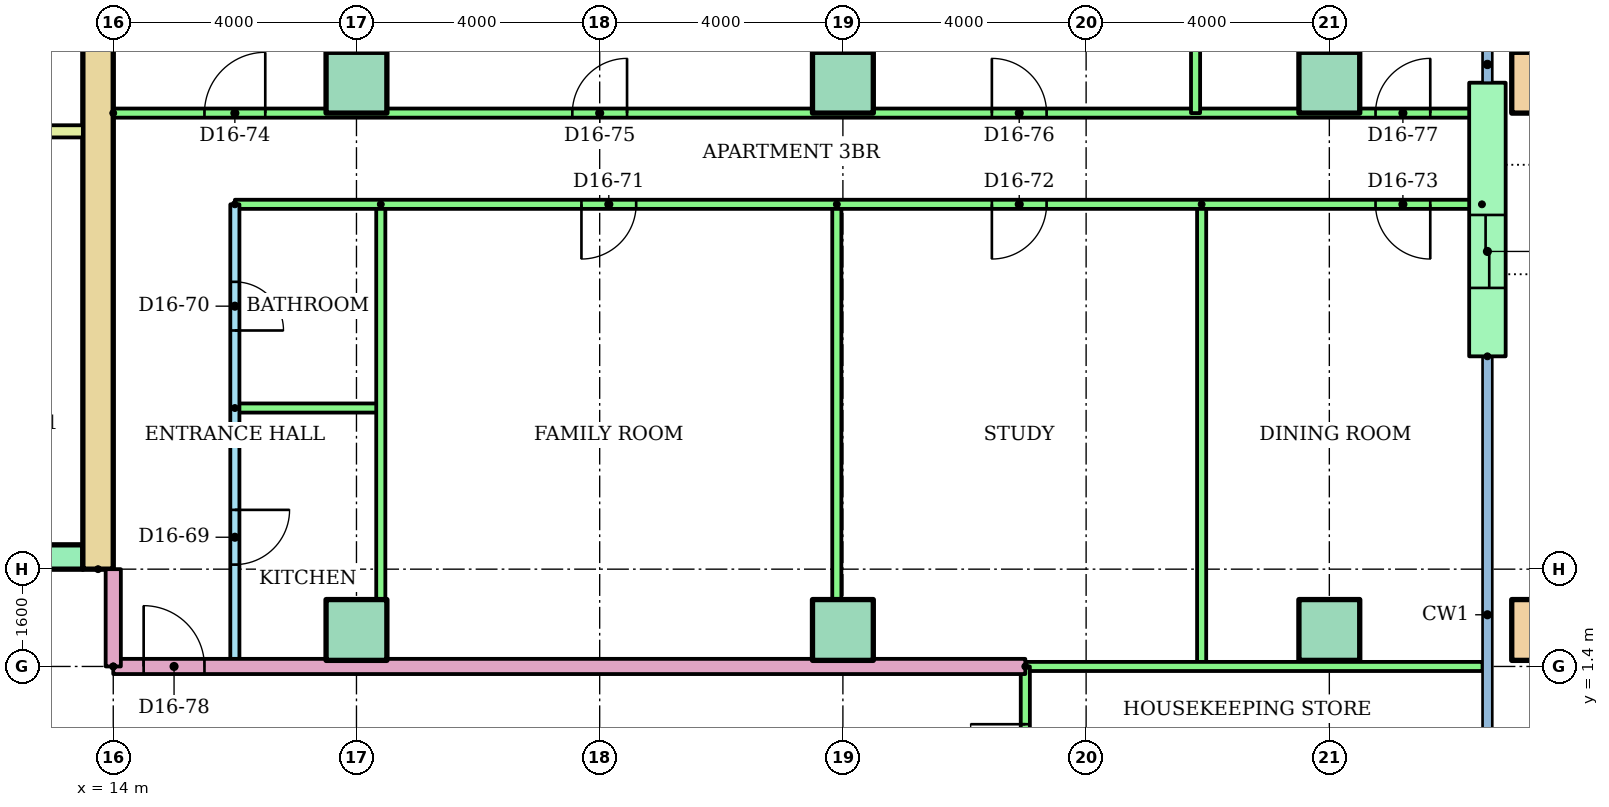
"""IFC4 building model, lengths in metres.
Left out: names, types, materials, properties, quantities, classifications, styles, units other than length and angle.
Written with IfcOpenShell. Run it as: python <this file> out.ifc"""

import sys

from ifc_helpers import new_model, si_unit, direction, frame, frame_2d, origin, origin_2d, place, context, subcontext, project, spatial, rectangle, hollow_rectangle, extrude, element, fill, save


model = new_model("IFC4")
c1 = context("Model", 3, precision=1e-05, world=origin(), true_north=direction((0.0, 1.0)))
c2 = subcontext(c1, "Body", "Model", "MODEL_VIEW")
j1 = project(units=[si_unit("LENGTHUNIT", "METRE"), si_unit("PLANEANGLEUNIT", "RADIAN")], contexts=[c1])
p1 = place(None, origin())
s1 = spatial("IfcSite", under=j1, at=p1, CompositionType="ELEMENT")
p2 = place(p1, origin())
s2 = spatial("IfcBuilding", under=s1, at=p2, CompositionType="ELEMENT")
p3 = place(p2, frame((0.0, 0.0, 60.8)))
s3 = spatial("IfcBuildingStorey", under=s2, at=p3, CompositionType="ELEMENT", Elevation=60.8)
for number, where in (
    (1, (18.0, 2.0, 0.0)),
    (2, (26.0, 2.0, 0.0)),
    (3, (34.0, 2.0, 0.0)),
):
    element("IfcColumn", number, at=place(p3, frame(where)), inside=s3, PredefinedType="COLUMN", context=c2, shape_type="SweptSolid", body=[
        extrude(rectangle(XDim=1.0, YDim=1.0, at=origin_2d()), origin(), (0.0, 0.0, 1.0), 3.2),
    ])
p4 = place(p3, frame((37.5, 2.0, 0.0)))
e4 = element("IfcColumn", 4, at=p4, inside=s3, PredefinedType="COLUMN", context=c2, shape_type="SweptSolid", body=[
    extrude(hollow_rectangle(XDim=1.0, YDim=1.0, WallThickness=0.05, at=origin_2d()), origin(), (0.0, 0.0, 1.0), 3.2),
])
for number, where in (
    (5, (18.0, 11.0, 0.0)),
    (6, (26.0, 11.0, 0.0)),
    (7, (34.0, 11.0, 0.0)),
):
    element("IfcColumn", number, at=place(p3, frame(where)), inside=s3, PredefinedType="COLUMN", context=c2, shape_type="SweptSolid", body=[
        extrude(rectangle(XDim=1.0, YDim=1.0, at=origin_2d()), origin(), (0.0, 0.0, 1.0), 3.2),
    ])
p5 = place(p3, frame((37.5, 11.0, 0.0)))
e8 = element("IfcColumn", 8, at=p5, inside=s3, PredefinedType="COLUMN", context=c2, shape_type="SweptSolid", body=[
    extrude(hollow_rectangle(XDim=1.0, YDim=1.0, WallThickness=0.05, at=origin_2d()), origin(), (0.0, 0.0, 1.0), 3.2),
])
p6 = place(p3, frame((36.6, 6.5, 0.0), z_axis=(0.0, 0.0, 1.0), x_axis=(0.0, 1.0, 0.0)))
e9 = element("IfcWall", 9, at=p6, inside=s3, PredefinedType="STANDARD", context=c2, shape_type="SweptSolid", body=[
    extrude(rectangle(XDim=4.5, YDim=0.6, at=frame_2d((2.25, 0.0))), origin(), (0.0, 0.0, 1.0), 2.8),
])
p7 = place(p6, frame((1.125, 0.0, 0.0)))
e10 = element("IfcOpeningElement", 10, at=p7, cuts=e9, PredefinedType="OPENING", context=c2, shape_type="SweptSolid", body=[
    extrude(rectangle(XDim=1.2, YDim=2.1, at=frame_2d((0.6, 1.05))), frame((0.0, 0.31, 0.0), z_axis=(0.0, -1.0, 0.0), x_axis=(1.0, 0.0, 0.0)), (0.0, 0.0, 1.0), 0.62),
])
p8 = place(p3, frame((13.75, 3.0, 0.0), z_axis=(0.0, 0.0, 1.0), x_axis=(0.0, 1.0, 0.0)))
e11 = element("IfcWall", 11, at=p8, inside=s3, PredefinedType="SHEAR", context=c2, shape_type="SweptSolid", body=[
    extrude(rectangle(XDim=17.0, YDim=0.5, at=frame_2d((8.5, 0.0))), origin(), (0.0, 0.0, 1.0), 2.8),
])
p9 = place(p3, frame((-13.5, 3.2, 0.0)))
e12 = element("IfcWall", 12, at=p9, inside=s3, PredefinedType="SHEAR", context=c2, shape_type="SweptSolid", body=[
    extrude(rectangle(XDim=27.0, YDim=0.4, at=frame_2d((13.5, 0.0))), origin(), (0.0, 0.0, 1.0), 2.8),
])
p10 = place(p9, frame((6.861, 0.0, 0.0)))
e13 = element("IfcOpeningElement", 13, at=p10, cuts=e12, PredefinedType="OPENING", context=c2, shape_type="SweptSolid", body=[
    extrude(rectangle(XDim=1.1, YDim=2.1, at=frame_2d((0.55, 1.05))), frame((0.0, 0.21, 0.0), z_axis=(0.0, -1.0, 0.0), x_axis=(1.0, 0.0, 0.0)), (0.0, 0.0, 1.0), 0.42),
])
p11 = place(p9, frame((9.906, 0.0, 0.0)))
e14 = element("IfcOpeningElement", 14, at=p11, cuts=e12, PredefinedType="OPENING", context=c2, shape_type="SweptSolid", body=[
    extrude(rectangle(XDim=1.1, YDim=2.1, at=frame_2d((0.55, 1.05))), frame((0.0, 0.21, 0.0), z_axis=(0.0, -1.0, 0.0), x_axis=(1.0, 0.0, 0.0)), (0.0, 0.0, 1.0), 0.42),
])
p12 = place(p9, frame((15.994, 0.0, 0.0)))
e15 = element("IfcOpeningElement", 15, at=p12, cuts=e12, PredefinedType="OPENING", context=c2, shape_type="SweptSolid", body=[
    extrude(rectangle(XDim=1.1, YDim=2.1, at=frame_2d((0.55, 1.05))), frame((0.0, 0.21, 0.0), z_axis=(0.0, -1.0, 0.0), x_axis=(1.0, 0.0, 0.0)), (0.0, 0.0, 1.0), 0.42),
])
p13 = place(p9, frame((19.039, 0.0, 0.0)))
e16 = element("IfcOpeningElement", 16, at=p13, cuts=e12, PredefinedType="OPENING", context=c2, shape_type="SweptSolid", body=[
    extrude(rectangle(XDim=1.1, YDim=2.1, at=frame_2d((0.55, 1.05))), frame((0.0, 0.21, 0.0), z_axis=(0.0, -1.0, 0.0), x_axis=(1.0, 0.0, 0.0)), (0.0, 0.0, 1.0), 0.42),
])
p14 = place(p9, frame((12.6, 0.0, 0.0)))
e17 = element("IfcOpeningElement", 17, at=p14, cuts=e12, PredefinedType="OPENING", context=c2, shape_type="SweptSolid", body=[
    extrude(rectangle(XDim=1.8, YDim=2.1, at=frame_2d((0.9, 1.05))), frame((0.0, 0.21, 0.0), z_axis=(0.0, -1.0, 0.0), x_axis=(1.0, 0.0, 0.0)), (0.0, 0.0, 1.0), 0.42),
])
p15 = place(p3, frame((9.6, 10.2, 0.0)))
e18 = element("IfcWall", 18, at=p15, inside=s3, PredefinedType="PARTITIONING", context=c2, shape_type="SweptSolid", body=[
    extrude(rectangle(XDim=3.9, YDim=0.2, at=frame_2d((1.95, 0.0))), origin(), (0.0, 0.0, 1.0), 2.8),
])
p16 = place(p3, frame((16.0, 9.0, 0.0), z_axis=(0.0, 0.0, 1.0), x_axis=(0.0, -1.0, 0.0)))
e19 = element("IfcWall", 19, at=p16, inside=s3, PredefinedType="PARTITIONING", context=c2, shape_type="SweptSolid", body=[
    extrude(rectangle(XDim=7.6, YDim=0.15, at=frame_2d((3.8, 0.0))), origin(), (0.0, 0.0, 1.0), 2.4),
])
p17 = place(p16, frame((5.025, 0.0, 0.0)))
e20 = element("IfcOpeningElement", 20, at=p17, cuts=e19, PredefinedType="OPENING", context=c2, shape_type="SweptSolid", body=[
    extrude(rectangle(XDim=0.9, YDim=2.1, at=frame_2d((0.45, 1.05))), frame((0.0, 0.085, 0.0), z_axis=(0.0, -1.0, 0.0), x_axis=(1.0, 0.0, 0.0)), (0.0, 0.0, 1.0), 0.17),
])
p18 = place(p16, frame((1.275, 0.0, 0.0)))
e21 = element("IfcOpeningElement", 21, at=p18, cuts=e19, PredefinedType="OPENING", context=c2, shape_type="SweptSolid", body=[
    extrude(rectangle(XDim=0.8, YDim=2.1, at=frame_2d((0.4, 1.05))), frame((0.0, 0.085, 0.0), z_axis=(0.0, -1.0, 0.0), x_axis=(1.0, 0.0, 0.0)), (0.0, 0.0, 1.0), 0.17),
])
p19 = place(p3, frame((16.0, 5.65, 0.0)))
e22 = element("IfcWall", 22, at=p19, inside=s3, PredefinedType="PARTITIONING", context=c2, shape_type="SweptSolid", body=[
    extrude(rectangle(XDim=2.4, YDim=0.15, at=frame_2d((1.2, 0.0))), origin(), (0.0, 0.0, 1.0), 2.4),
])
for number, where, z_axis, x_axis in (
    (23, (18.4, 9.0, 0.0), (0.0, 0.0, 1.0), (0.0, -1.0, 0.0)),
    (24, (25.9, 9.0, 0.0), (0.0, 0.0, 1.0), (0.0, -1.0, 0.0)),
    (25, (31.9, 9.0, 0.0), (0.0, 0.0, 1.0), (0.0, -1.0, 0.0)),
):
    element("IfcWall", number, at=place(p3, frame(where, z_axis=z_axis, x_axis=x_axis)), inside=s3, PredefinedType="PARTITIONING", context=c2, shape_type="SweptSolid", body=[
        extrude(rectangle(XDim=7.6, YDim=0.15, at=frame_2d((3.8, 0.0))), origin(), (0.0, 0.0, 1.0), 2.4),
    ])
p20 = place(p3, frame((36.51, 9.0, 0.0), z_axis=(0.0, 0.0, 1.0), x_axis=(-1.0, 0.0, 0.0)))
e26 = element("IfcWall", 26, at=p20, inside=s3, PredefinedType="PARTITIONING", context=c2, shape_type="SweptSolid", body=[
    extrude(rectangle(XDim=20.51, YDim=0.15, at=frame_2d((10.255, 0.0))), origin(), (0.0, 0.0, 1.0), 2.4),
])
p21 = place(p20, frame((13.91, 0.0, 0.0)))
e27 = element("IfcOpeningElement", 27, at=p21, cuts=e26, PredefinedType="OPENING", context=c2, shape_type="SweptSolid", body=[
    extrude(rectangle(XDim=0.9, YDim=2.1, at=frame_2d((0.45, 1.05))), frame((0.0, 0.085, 0.0), z_axis=(0.0, -1.0, 0.0), x_axis=(1.0, 0.0, 0.0)), (0.0, 0.0, 1.0), 0.17),
])
p22 = place(p20, frame((7.16, 0.0, 0.0)))
e28 = element("IfcOpeningElement", 28, at=p22, cuts=e26, PredefinedType="OPENING", context=c2, shape_type="SweptSolid", body=[
    extrude(rectangle(XDim=0.9, YDim=2.1, at=frame_2d((0.45, 1.05))), frame((0.0, 0.085, 0.0), z_axis=(0.0, -1.0, 0.0), x_axis=(1.0, 0.0, 0.0)), (0.0, 0.0, 1.0), 0.17),
])
p23 = place(p20, frame((0.85, 0.0, 0.0)))
e29 = element("IfcOpeningElement", 29, at=p23, cuts=e26, PredefinedType="OPENING", context=c2, shape_type="SweptSolid", body=[
    extrude(rectangle(XDim=0.9, YDim=2.1, at=frame_2d((0.45, 1.05))), frame((0.0, 0.085, 0.0), z_axis=(0.0, -1.0, 0.0), x_axis=(1.0, 0.0, 0.0)), (0.0, 0.0, 1.0), 0.17),
])
p24 = place(p3, frame((14.0, 10.5, 0.0)))
e30 = element("IfcWall", 30, at=p24, inside=s3, PredefinedType="PARTITIONING", context=c2, shape_type="SweptSolid", body=[
    extrude(rectangle(XDim=22.51, YDim=0.15, at=frame_2d((11.255, 0.0))), origin(), (0.0, 0.0, 1.0), 2.4),
])
p25 = place(p24, frame((1.5, 0.0, 0.0)))
e31 = element("IfcOpeningElement", 31, at=p25, cuts=e30, PredefinedType="OPENING", context=c2, shape_type="SweptSolid", body=[
    extrude(rectangle(XDim=1.0, YDim=2.1, at=frame_2d((0.5, 1.05))), frame((0.0, 0.085, 0.0), z_axis=(0.0, -1.0, 0.0), x_axis=(1.0, 0.0, 0.0)), (0.0, 0.0, 1.0), 0.17),
])
p26 = place(p24, frame((7.55, 0.0, 0.0)))
e32 = element("IfcOpeningElement", 32, at=p26, cuts=e30, PredefinedType="OPENING", context=c2, shape_type="SweptSolid", body=[
    extrude(rectangle(XDim=0.9, YDim=2.1, at=frame_2d((0.45, 1.05))), frame((0.0, 0.085, 0.0), z_axis=(0.0, -1.0, 0.0), x_axis=(1.0, 0.0, 0.0)), (0.0, 0.0, 1.0), 0.17),
])
p27 = place(p24, frame((14.45, 0.0, 0.0)))
e33 = element("IfcOpeningElement", 33, at=p27, cuts=e30, PredefinedType="OPENING", context=c2, shape_type="SweptSolid", body=[
    extrude(rectangle(XDim=0.9, YDim=2.1, at=frame_2d((0.45, 1.05))), frame((0.0, 0.085, 0.0), z_axis=(0.0, -1.0, 0.0), x_axis=(1.0, 0.0, 0.0)), (0.0, 0.0, 1.0), 0.17),
])
p28 = place(p24, frame((20.76, 0.0, 0.0)))
e34 = element("IfcOpeningElement", 34, at=p28, cuts=e30, PredefinedType="OPENING", context=c2, shape_type="SweptSolid", body=[
    extrude(rectangle(XDim=0.9, YDim=2.1, at=frame_2d((0.45, 1.05))), frame((0.0, 0.085, 0.0), z_axis=(0.0, -1.0, 0.0), x_axis=(1.0, 0.0, 0.0)), (0.0, 0.0, 1.0), 0.17),
])
for number, where, z_axis, x_axis in (
    (35, (18.0, 18.521, 0.0), (0.0, 0.0, 1.0), (0.0, -1.0, 0.0)),
    (36, (26.0, 18.521, 0.0), (0.0, 0.0, 1.0), (0.0, -1.0, 0.0)),
):
    element("IfcWall", number, at=place(p3, frame(where, z_axis=z_axis, x_axis=x_axis)), inside=s3, PredefinedType="PARTITIONING", context=c2, shape_type="SweptSolid", body=[
        extrude(rectangle(XDim=8.021, YDim=0.15, at=frame_2d((4.01, 0.0))), origin(), (0.0, 0.0, 1.0), 2.4),
    ])
p29 = place(p3, frame((31.8, 16.72, 0.0), z_axis=(0.0, 0.0, 1.0), x_axis=(0.0, -1.0, 0.0)))
e37 = element("IfcWall", 37, at=p29, inside=s3, PredefinedType="PARTITIONING", context=c2, shape_type="SweptSolid", body=[
    extrude(rectangle(XDim=6.22, YDim=0.15, at=frame_2d((3.11, 0.0))), origin(), (0.0, 0.0, 1.0), 2.4),
])
p30 = place(p3, frame((14.0, 1.4, 0.0)))
e38 = element("IfcWall", 38, at=p30, inside=s3, PredefinedType="PARTITIONING", context=c2, shape_type="SweptSolid", body=[
    extrude(rectangle(XDim=15.0, YDim=0.25, at=frame_2d((7.5, 0.0))), origin(), (0.0, 0.0, 1.0), 2.4),
])
p31 = place(p30, frame((0.5, 0.0, 0.0)))
e39 = element("IfcOpeningElement", 39, at=p31, cuts=e38, PredefinedType="OPENING", context=c2, shape_type="SweptSolid", body=[
    extrude(rectangle(XDim=1.0, YDim=2.1, at=frame_2d((0.5, 1.05))), frame((0.0, 0.135, 0.0), z_axis=(0.0, -1.0, 0.0), x_axis=(1.0, 0.0, 0.0)), (0.0, 0.0, 1.0), 0.27),
])
p32 = place(p3, frame((29.0, 1.4, 0.0)))
e40 = element("IfcWall", 40, at=p32, inside=s3, PredefinedType="PARTITIONING", context=c2, shape_type="SweptSolid", body=[
    extrude(rectangle(XDim=7.52, YDim=0.15, at=frame_2d((3.76, 0.0))), origin(), (0.0, 0.0, 1.0), 2.4),
])
p33 = place(p3, frame((29.0, -1.4, 0.0), z_axis=(0.0, 0.0, 1.0), x_axis=(0.0, 1.0, 0.0)))
e41 = element("IfcWall", 41, at=p33, inside=s3, PredefinedType="PARTITIONING", context=c2, shape_type="SweptSolid", body=[
    extrude(rectangle(XDim=2.8, YDim=0.15, at=frame_2d((1.4, 0.0))), origin(), (0.0, 0.0, 1.0), 2.4),
])
p34 = place(p33, frame((0.95, 0.0, 0.0)))
e42 = element("IfcOpeningElement", 42, at=p34, cuts=e41, PredefinedType="OPENING", context=c2, shape_type="SweptSolid", body=[
    extrude(rectangle(XDim=0.9, YDim=2.1, at=frame_2d((0.45, 1.05))), frame((0.0, 0.085, 0.0), z_axis=(0.0, -1.0, 0.0), x_axis=(1.0, 0.0, 0.0)), (0.0, 0.0, 1.0), 0.17),
])
p35 = place(p3, frame((14.0, 1.4, 0.0), z_axis=(0.0, 0.0, 1.0), x_axis=(0.0, 1.0, 0.0)))
e43 = element("IfcWall", 43, at=p35, inside=s3, PredefinedType="PARTITIONING", context=c2, shape_type="SweptSolid", body=[
    extrude(rectangle(XDim=1.6, YDim=0.25, at=frame_2d((0.8, 0.0))), origin(), (0.0, 0.0, 1.0), 2.4),
])
p36 = place(p17, origin())
e44 = element("IfcDoor", 44, at=p36, inside=s3, OperationType="SINGLE_SWING_LEFT", PredefinedType="DOOR", context=c2, shape_type="SweptSolid", body=[
    extrude(rectangle(XDim=0.9, YDim=2.1, at=frame_2d((0.45, 1.05))), frame((0.0, 0.025, 0.0), z_axis=(0.0, -1.0, 0.0), x_axis=(1.0, 0.0, 0.0)), (0.0, 0.0, 1.0), 0.05),
])
fill(e20, e44)
p37 = place(p18, origin())
e45 = element("IfcDoor", 45, at=p37, inside=s3, OperationType="SINGLE_SWING_RIGHT", PredefinedType="DOOR", context=c2, shape_type="SweptSolid", body=[
    extrude(rectangle(XDim=0.8, YDim=2.1, at=frame_2d((0.4, 1.05))), frame((0.0, 0.025, 0.0), z_axis=(0.0, -1.0, 0.0), x_axis=(1.0, 0.0, 0.0)), (0.0, 0.0, 1.0), 0.05),
])
fill(e21, e45)
p38 = place(p21, origin())
e46 = element("IfcDoor", 46, at=p38, inside=s3, OperationType="SINGLE_SWING_RIGHT", PredefinedType="DOOR", context=c2, shape_type="SweptSolid", body=[
    extrude(rectangle(XDim=0.9, YDim=2.1, at=frame_2d((0.45, 1.05))), frame((0.0, 0.025, 0.0), z_axis=(0.0, -1.0, 0.0), x_axis=(1.0, 0.0, 0.0)), (0.0, 0.0, 1.0), 0.05),
])
fill(e27, e46)
p39 = place(p22, origin())
e47 = element("IfcDoor", 47, at=p39, inside=s3, OperationType="SINGLE_SWING_RIGHT", PredefinedType="DOOR", context=c2, shape_type="SweptSolid", body=[
    extrude(rectangle(XDim=0.9, YDim=2.1, at=frame_2d((0.45, 1.05))), frame((0.0, 0.025, 0.0), z_axis=(0.0, -1.0, 0.0), x_axis=(1.0, 0.0, 0.0)), (0.0, 0.0, 1.0), 0.05),
])
fill(e28, e47)
p40 = place(p23, origin())
e48 = element("IfcDoor", 48, at=p40, inside=s3, OperationType="SINGLE_SWING_LEFT", PredefinedType="DOOR", context=c2, shape_type="SweptSolid", body=[
    extrude(rectangle(XDim=0.9, YDim=2.1, at=frame_2d((0.45, 1.05))), frame((0.0, 0.025, 0.0), z_axis=(0.0, -1.0, 0.0), x_axis=(1.0, 0.0, 0.0)), (0.0, 0.0, 1.0), 0.05),
])
fill(e29, e48)
p41 = place(p25, origin())
e49 = element("IfcDoor", 49, at=p41, inside=s3, OperationType="SINGLE_SWING_RIGHT", PredefinedType="DOOR", context=c2, shape_type="SweptSolid", body=[
    extrude(rectangle(XDim=1.0, YDim=2.1, at=frame_2d((0.5, 1.05))), frame((0.0, 0.025, 0.0), z_axis=(0.0, -1.0, 0.0), x_axis=(1.0, 0.0, 0.0)), (0.0, 0.0, 1.0), 0.05),
])
fill(e31, e49)
p42 = place(p26, origin())
e50 = element("IfcDoor", 50, at=p42, inside=s3, OperationType="SINGLE_SWING_RIGHT", PredefinedType="DOOR", context=c2, shape_type="SweptSolid", body=[
    extrude(rectangle(XDim=0.9, YDim=2.1, at=frame_2d((0.45, 1.05))), frame((0.0, 0.025, 0.0), z_axis=(0.0, -1.0, 0.0), x_axis=(1.0, 0.0, 0.0)), (0.0, 0.0, 1.0), 0.05),
])
fill(e32, e50)
p43 = place(p27, origin())
e51 = element("IfcDoor", 51, at=p43, inside=s3, OperationType="SINGLE_SWING_LEFT", PredefinedType="DOOR", context=c2, shape_type="SweptSolid", body=[
    extrude(rectangle(XDim=0.9, YDim=2.1, at=frame_2d((0.45, 1.05))), frame((0.0, 0.025, 0.0), z_axis=(0.0, -1.0, 0.0), x_axis=(1.0, 0.0, 0.0)), (0.0, 0.0, 1.0), 0.05),
])
fill(e33, e51)
p44 = place(p28, origin())
e52 = element("IfcDoor", 52, at=p44, inside=s3, OperationType="SINGLE_SWING_RIGHT", PredefinedType="DOOR", context=c2, shape_type="SweptSolid", body=[
    extrude(rectangle(XDim=0.9, YDim=2.1, at=frame_2d((0.45, 1.05))), frame((0.0, 0.025, 0.0), z_axis=(0.0, -1.0, 0.0), x_axis=(1.0, 0.0, 0.0)), (0.0, 0.0, 1.0), 0.05),
])
fill(e34, e52)
p45 = place(p31, origin())
e53 = element("IfcDoor", 53, at=p45, inside=s3, OperationType="SINGLE_SWING_LEFT", PredefinedType="DOOR", context=c2, shape_type="SweptSolid", body=[
    extrude(rectangle(XDim=1.0, YDim=2.1, at=frame_2d((0.5, 1.05))), frame((0.0, 0.025, 0.0), z_axis=(0.0, -1.0, 0.0), x_axis=(1.0, 0.0, 0.0)), (0.0, 0.0, 1.0), 0.05),
])
fill(e39, e53)
p46 = place(p34, origin())
e54 = element("IfcDoor", 54, at=p46, inside=s3, OperationType="SINGLE_SWING_RIGHT", PredefinedType="DOOR", context=c2, shape_type="SweptSolid", body=[
    extrude(rectangle(XDim=0.9, YDim=2.1, at=frame_2d((0.45, 1.05))), frame((0.0, 0.025, 0.0), z_axis=(0.0, -1.0, 0.0), x_axis=(1.0, 0.0, 0.0)), (0.0, 0.0, 1.0), 0.05),
])
fill(e42, e54)
p47 = place(p7, origin())
e55 = element("IfcDoor", 55, at=p47, inside=s3, OperationType="SLIDING_TO_LEFT", PredefinedType="DOOR", context=c2, shape_type="SweptSolid", body=[
    extrude(rectangle(XDim=1.2, YDim=2.1, at=frame_2d((0.6, 1.05))), frame((0.0, 0.025, 0.0), z_axis=(0.0, -1.0, 0.0), x_axis=(1.0, 0.0, 0.0)), (0.0, 0.0, 1.0), 0.05),
])
fill(e10, e55)
save(model, sys.argv[1])
